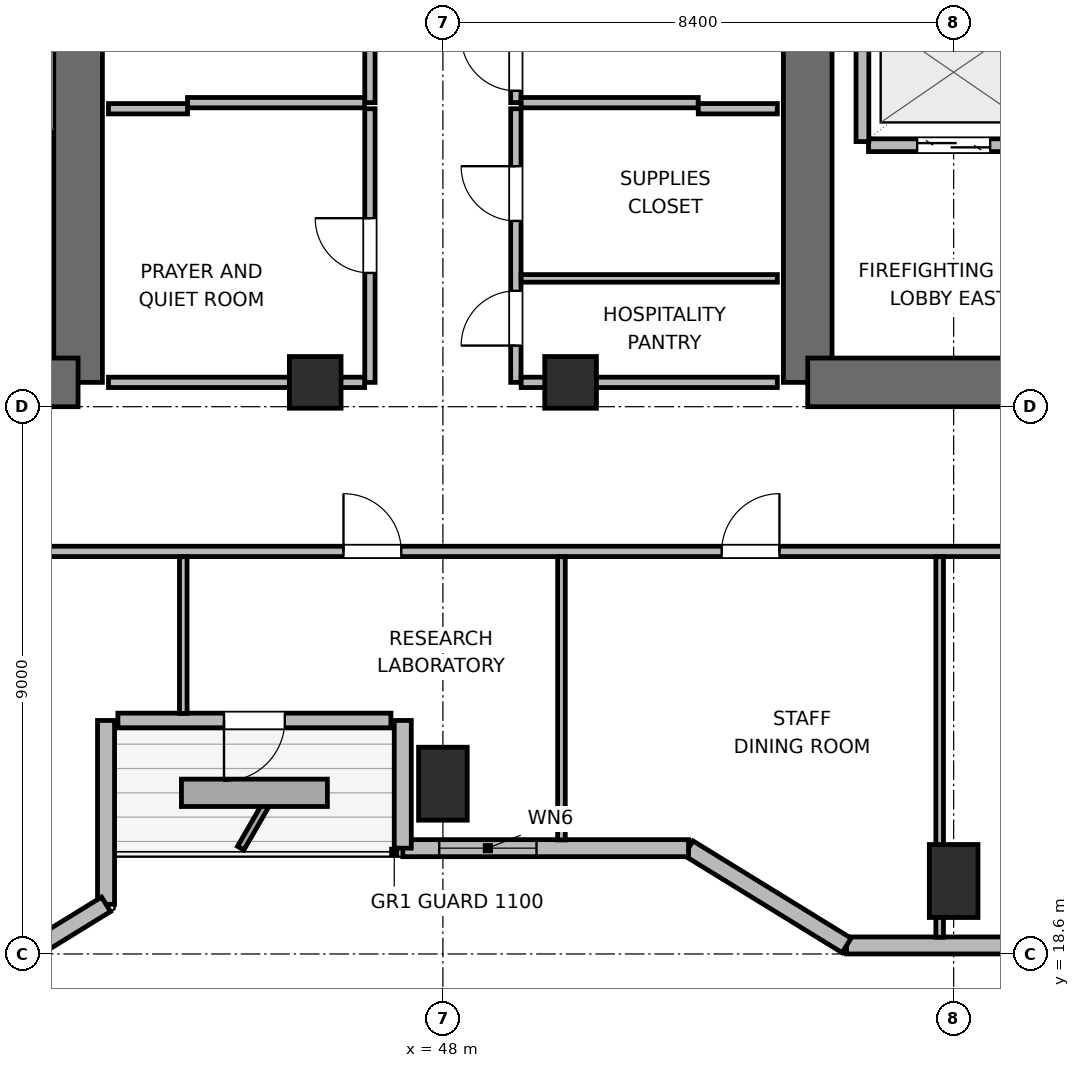
"""IFC4 building model, lengths in metres.
Left out: names, types, materials, properties, quantities, classifications, styles, units other than length and angle.
Written with IfcOpenShell. Run it as: python <this file> out.ifc"""

import sys

from ifc_helpers import new_model, si_unit, direction, frame, frame_2d, origin, origin_2d, place, context, subcontext, project, spatial, rectangle, extrude, element, fill, save


model = new_model("IFC4")
c1 = context("Model", 3, precision=1e-05, world=origin(), true_north=direction((0.0, 1.0)))
c2 = subcontext(c1, "Body", "Model", "MODEL_VIEW")
j1 = project(units=[si_unit("LENGTHUNIT", "METRE"), si_unit("PLANEANGLEUNIT", "RADIAN")], contexts=[c1])
p1 = place(None, origin())
s1 = spatial("IfcSite", under=j1, at=p1, CompositionType="ELEMENT")
p2 = place(p1, origin())
s2 = spatial("IfcBuilding", under=s1, at=p2, CompositionType="ELEMENT")
p3 = place(p2, frame((0.0, 0.0, 154.5)))
s3 = spatial("IfcBuildingStorey", under=s2, at=p3, CompositionType="ELEMENT", Elevation=154.5)
p4 = place(p3, frame((42.0, 28.0, 0.0), z_axis=(0.0, 0.0, 1.0), x_axis=(0.0, 1.0, 0.0)))
e1 = element("IfcWall", 1, at=p4, inside=s3, PredefinedType="SHEAR", context=c2, shape_type="SweptSolid", body=[
    extrude(rectangle(XDim=6.4, YDim=0.8, at=frame_2d((3.2, 0.0))), origin(), (0.0, 0.0, 1.0), 3.9),
])
p5 = place(p3, frame((32.8, 28.0, 0.0), z_axis=(0.0, 0.0, 1.0), x_axis=(1.0, 0.0, 0.0)))
e2 = element("IfcWall", 2, at=p5, inside=s3, PredefinedType="SHEAR", context=c2, shape_type="SweptSolid", body=[
    extrude(rectangle(XDim=9.2, YDim=0.8, at=frame_2d((4.6, 0.0))), origin(), (0.0, 0.0, 1.0), 3.9),
])
p6 = place(p5, frame((5.025, 0.0, 0.0)))
e3 = element("IfcOpeningElement", 3, at=p6, cuts=e2, PredefinedType="OPENING", context=c2, shape_type="SweptSolid", body=[
    extrude(rectangle(XDim=1.05, YDim=2.04, at=frame_2d((0.525, 1.02))), frame((0.0, 0.41, 0.0), z_axis=(0.0, -1.0, 0.0), x_axis=(1.0, 0.0, 0.0)), (0.0, 0.0, 1.0), 0.82),
])
p7 = place(p3, frame((54.0, 28.0, 0.0), z_axis=(0.0, 0.0, 1.0), x_axis=(0.0, 1.0, 0.0)))
e4 = element("IfcWall", 4, at=p7, inside=s3, PredefinedType="SHEAR", context=c2, shape_type="SweptSolid", body=[
    extrude(rectangle(XDim=7.8, YDim=0.8, at=frame_2d((3.9, 0.0))), origin(), (0.0, 0.0, 1.0), 3.9),
])
p8 = place(p3, frame((54.0, 28.0, 0.0), z_axis=(0.0, 0.0, 1.0), x_axis=(1.0, 0.0, 0.0)))
e5 = element("IfcWall", 5, at=p8, inside=s3, PredefinedType="SHEAR", context=c2, shape_type="SweptSolid", body=[
    extrude(rectangle(XDim=9.2, YDim=0.8, at=frame_2d((4.6, 0.0))), origin(), (0.0, 0.0, 1.0), 3.9),
])
p9 = place(p8, frame((3.975, 0.0, 0.0)))
e6 = element("IfcOpeningElement", 6, at=p9, cuts=e5, PredefinedType="OPENING", context=c2, shape_type="SweptSolid", body=[
    extrude(rectangle(XDim=1.05, YDim=2.04, at=frame_2d((0.525, 1.02))), frame((0.0, 0.41, 0.0), z_axis=(0.0, -1.0, 0.0), x_axis=(1.0, 0.0, 0.0)), (0.0, 0.0, 1.0), 0.82),
])
for number, where, z_axis, x_axis in (
    (7, (48.0, 21.4, 0.0), (0.0, 0.0, 1.0), (1.0, 0.0, 0.0)),
    (8, (56.4, 19.8, 0.0), (0.0, 0.0, 1.0), (1.0, 0.0, 0.0)),
):
    element("IfcColumn", number, at=place(p3, frame(where, z_axis=z_axis, x_axis=x_axis)), inside=s3, PredefinedType="COLUMN", context=c2, shape_type="SweptSolid", body=[
        extrude(rectangle(XDim=0.8, YDim=1.2, at=origin_2d()), origin(), (0.0, 0.0, 1.0), 3.9),
    ])
for number, where, z_axis, x_axis in (
    (9, (45.9, 28.0, 0.0), (0.0, 0.0, 1.0), (1.0, 0.0, 0.0)),
    (10, (50.1, 28.0, 0.0), (0.0, 0.0, 1.0), (1.0, 0.0, 0.0)),
):
    element("IfcColumn", number, at=place(p3, frame(where, z_axis=z_axis, x_axis=x_axis)), inside=s3, PredefinedType="COLUMN", context=c2, shape_type="SweptSolid", body=[
        extrude(rectangle(XDim=0.85, YDim=0.85, at=origin_2d()), origin(), (0.0, 0.0, 1.0), 3.9),
    ])
p10 = place(p3, frame((65.382, 18.74, 0.0), z_axis=(0.0, 0.0, 1.0), x_axis=(-1.0, 0.0, 0.0)))
e11 = element("IfcWall", 11, at=p10, inside=s3, PredefinedType="SOLIDWALL", context=c2, shape_type="SweptSolid", body=[
    extrude(rectangle(XDim=10.742, YDim=0.28, at=frame_2d((5.371, 0.0))), origin(), (0.0, 0.0, 1.0), 3.68),
])
p11 = place(p10, frame((3.951, 0.0, 0.85)))
e12 = element("IfcOpeningElement", 12, at=p11, cuts=e11, PredefinedType="OPENING", context=c2, shape_type="SweptSolid", body=[
    extrude(rectangle(XDim=1.5, YDim=1.1, at=frame_2d((0.75, 0.55))), frame((0.0, 0.15, 0.0), z_axis=(0.0, -1.0, 0.0), x_axis=(1.0, 0.0, 0.0)), (0.0, 0.0, 1.0), 0.3),
])
p12 = place(p3, frame((54.64, 18.74, 0.0), z_axis=(0.0, 0.0, 1.0), x_axis=(-0.851652825334, 0.524106349037, 0.0)))
e13 = element("IfcWall", 13, at=p12, inside=s3, PredefinedType="SOLIDWALL", context=c2, shape_type="SweptSolid", body=[
    extrude(rectangle(XDim=3.053, YDim=0.28, at=frame_2d((1.526, 0.0))), origin(), (0.0, 0.0, 1.0), 2.265),
])
p13 = place(p3, frame((52.04, 20.34, 0.0), z_axis=(0.0, 0.0, 1.0), x_axis=(-1.0, 0.0, 0.0)))
e14 = element("IfcWall", 14, at=p13, inside=s3, PredefinedType="SOLIDWALL", context=c2, shape_type="SweptSolid", body=[
    extrude(rectangle(XDim=4.699, YDim=0.28, at=frame_2d((2.35, 0.0))), origin(), (0.0, 0.0, 1.0), 2.265),
])
p14 = place(p13, frame((2.5, 0.0, 0.85)))
e15 = element("IfcOpeningElement", 15, at=p14, cuts=e14, PredefinedType="OPENING", context=c2, shape_type="SweptSolid", body=[
    extrude(rectangle(XDim=1.6, YDim=1.0, at=frame_2d((0.8, 0.5))), frame((0.0, 0.15, 0.0), z_axis=(0.0, -1.0, 0.0), x_axis=(1.0, 0.0, 0.0)), (0.0, 0.0, 1.0), 0.3),
])
p15 = place(p3, frame((47.34, 20.34, 0.0), z_axis=(0.0, 0.0, 1.0), x_axis=(0.0, 1.0, 0.0)))
e16 = element("IfcWall", 16, at=p15, inside=s3, PredefinedType="SOLIDWALL", context=c2, shape_type="SweptSolid", body=[
    extrude(rectangle(XDim=2.1, YDim=0.28, at=frame_2d((1.05, 0.0))), origin(), (0.0, 0.0, 1.0), 2.265),
])
p16 = place(p3, frame((47.145, 22.44, 0.0), z_axis=(0.0, 0.0, 1.0), x_axis=(-1.0, 0.0, 0.0)))
e17 = element("IfcWall", 17, at=p16, inside=s3, PredefinedType="SOLIDWALL", context=c2, shape_type="SweptSolid", body=[
    extrude(rectangle(XDim=4.49, YDim=0.24, at=frame_2d((2.245, 0.0))), origin(), (0.0, 0.0, 1.0), 3.68),
])
p17 = place(p16, frame((1.745, 0.0, 0.0)))
e18 = element("IfcOpeningElement", 18, at=p17, cuts=e17, PredefinedType="OPENING", context=c2, shape_type="SweptSolid", body=[
    extrude(rectangle(XDim=1.0, YDim=2.02, at=frame_2d((0.5, 1.01))), frame((0.0, 0.13, 0.0), z_axis=(0.0, -1.0, 0.0), x_axis=(1.0, 0.0, 0.0)), (0.0, 0.0, 1.0), 0.26),
])
p18 = place(p3, frame((42.46, 22.44, 0.0), z_axis=(0.0, 0.0, 1.0), x_axis=(0.0, -1.0, 0.0)))
e19 = element("IfcWall", 19, at=p18, inside=s3, PredefinedType="SOLIDWALL", context=c2, shape_type="SweptSolid", body=[
    extrude(rectangle(XDim=3.024, YDim=0.28, at=frame_2d((1.512, 0.0))), origin(), (0.0, 0.0, 1.0), 2.265),
])
p19 = place(p3, frame((42.46, 19.416, 0.0), z_axis=(0.0, 0.0, 1.0), x_axis=(-0.851801140441, -0.523865266212, 0.0)))
e20 = element("IfcWall", 20, at=p19, inside=s3, PredefinedType="SOLIDWALL", context=c2, shape_type="SweptSolid", body=[
    extrude(rectangle(XDim=1.291, YDim=0.28, at=frame_2d((0.646, 0.0))), origin(), (0.0, 0.0, 1.0), 3.68),
])
p20 = place(p3, frame((55.0, 31.9, 0.0), z_axis=(0.0, 0.0, 1.0), x_axis=(1.0, 0.0, 0.0)))
e21 = element("IfcWall", 21, at=p20, inside=s3, PredefinedType="PARTITIONING", context=c2, shape_type="SweptSolid", body=[
    extrude(rectangle(XDim=2.8, YDim=0.21, at=frame_2d((1.4, 0.0))), origin(), (0.0, 0.0, 1.0), 3.68),
])
p21 = place(p20, frame((0.8, 0.0, 0.0)))
e22 = element("IfcOpeningElement", 22, at=p21, cuts=e21, PredefinedType="OPENING", context=c2, shape_type="SweptSolid", body=[
    extrude(rectangle(XDim=1.2, YDim=2.04, at=frame_2d((0.6, 1.02))), frame((0.0, 0.115, 0.0), z_axis=(0.0, -1.0, 0.0), x_axis=(1.0, 0.0, 0.0)), (0.0, 0.0, 1.0), 0.23),
])
p22 = place(p3, frame((54.9, 31.96, 0.0), z_axis=(0.0, 0.0, 1.0), x_axis=(0.0, 1.0, 0.0)))
e23 = element("IfcWall", 23, at=p22, inside=s3, PredefinedType="PARTITIONING", context=c2, shape_type="SweptSolid", body=[
    extrude(rectangle(XDim=2.28, YDim=0.21, at=frame_2d((1.14, 0.0))), origin(), (0.0, 0.0, 1.0), 3.68),
])
p23 = place(p3, frame((46.8, 32.6, 0.0), z_axis=(0.0, 0.0, 1.0), x_axis=(0.0, 1.0, 0.0)))
e24 = element("IfcWall", 24, at=p23, inside=s3, PredefinedType="PARTITIONING", context=c2, shape_type="SweptSolid", body=[
    extrude(rectangle(XDim=3.8, YDim=0.17, at=frame_2d((1.9, 0.0))), origin(), (0.0, 0.0, 1.0), 3.68),
])
p24 = place(p23, frame((1.45, 0.0, 0.0)))
e25 = element("IfcOpeningElement", 25, at=p24, cuts=e24, PredefinedType="OPENING", context=c2, shape_type="SweptSolid", body=[
    extrude(rectangle(XDim=0.9, YDim=2.02, at=frame_2d((0.45, 1.01))), frame((0.0, 0.095, 0.0), z_axis=(0.0, -1.0, 0.0), x_axis=(1.0, 0.0, 0.0)), (0.0, 0.0, 1.0), 0.19),
])
p25 = place(p3, frame((43.8, 32.6, 0.0), z_axis=(0.0, 0.0, 1.0), x_axis=(1.0, 0.0, 0.0)))
e26 = element("IfcWall", 26, at=p25, inside=s3, PredefinedType="PARTITIONING", context=c2, shape_type="SweptSolid", body=[
    extrude(rectangle(XDim=2.913, YDim=0.17, at=frame_2d((1.457, 0.0))), origin(), (0.0, 0.0, 1.0), 3.68),
])
p26 = place(p3, frame((49.2, 32.6, 0.0), z_axis=(0.0, 0.0, 1.0), x_axis=(0.0, 1.0, 0.0)))
e27 = element("IfcWall", 27, at=p26, inside=s3, PredefinedType="PARTITIONING", context=c2, shape_type="SweptSolid", body=[
    extrude(rectangle(XDim=3.4, YDim=0.17, at=frame_2d((1.7, 0.0))), origin(), (0.0, 0.0, 1.0), 3.68),
])
p27 = place(p26, frame((0.196, 0.0, 0.0)))
e28 = element("IfcOpeningElement", 28, at=p27, cuts=e27, PredefinedType="OPENING", context=c2, shape_type="SweptSolid", body=[
    extrude(rectangle(XDim=0.9, YDim=2.02, at=frame_2d((0.45, 1.01))), frame((0.0, 0.095, 0.0), z_axis=(0.0, -1.0, 0.0), x_axis=(1.0, 0.0, 0.0)), (0.0, 0.0, 1.0), 0.19),
])
p28 = place(p26, frame((1.896, 0.0, 0.0)))
e29 = element("IfcOpeningElement", 29, at=p28, cuts=e27, PredefinedType="OPENING", context=c2, shape_type="SweptSolid", body=[
    extrude(rectangle(XDim=0.9, YDim=2.02, at=frame_2d((0.45, 1.01))), frame((0.0, 0.095, 0.0), z_axis=(0.0, -1.0, 0.0), x_axis=(1.0, 0.0, 0.0)), (0.0, 0.0, 1.0), 0.19),
])
p29 = place(p3, frame((49.287, 32.6, 0.0), z_axis=(0.0, 0.0, 1.0), x_axis=(1.0, 0.0, 0.0)))
e30 = element("IfcWall", 30, at=p29, inside=s3, PredefinedType="PARTITIONING", context=c2, shape_type="SweptSolid", body=[
    extrude(rectangle(XDim=2.913, YDim=0.17, at=frame_2d((1.457, 0.0))), origin(), (0.0, 0.0, 1.0), 3.68),
])
p30 = place(p3, frame((46.8, 28.0, 0.0), z_axis=(0.0, 0.0, 1.0), x_axis=(0.0, 1.0, 0.0)))
e31 = element("IfcWall", 31, at=p30, inside=s3, PredefinedType="PARTITIONING", context=c2, shape_type="SweptSolid", body=[
    extrude(rectangle(XDim=4.5, YDim=0.17, at=frame_2d((2.25, 0.0))), origin(), (0.0, 0.0, 1.0), 3.68),
])
p31 = place(p30, frame((1.8, 0.0, 0.0)))
e32 = element("IfcOpeningElement", 32, at=p31, cuts=e31, PredefinedType="OPENING", context=c2, shape_type="SweptSolid", body=[
    extrude(rectangle(XDim=0.9, YDim=2.02, at=frame_2d((0.45, 1.01))), frame((0.0, 0.095, 0.0), z_axis=(0.0, -1.0, 0.0), x_axis=(1.0, 0.0, 0.0)), (0.0, 0.0, 1.0), 0.19),
])
p32 = place(p3, frame((42.5, 28.0, 0.0), z_axis=(0.0, 0.0, 1.0), x_axis=(1.0, 0.0, 0.0)))
e33 = element("IfcWall", 33, at=p32, inside=s3, PredefinedType="PARTITIONING", context=c2, shape_type="SweptSolid", body=[
    extrude(rectangle(XDim=4.213, YDim=0.17, at=frame_2d((2.106, 0.0))), origin(), (0.0, 0.0, 1.0), 2.565),
])
p33 = place(p3, frame((42.5, 32.5, 0.0), z_axis=(0.0, 0.0, 1.0), x_axis=(1.0, 0.0, 0.0)))
e34 = element("IfcWall", 34, at=p33, inside=s3, PredefinedType="PARTITIONING", context=c2, shape_type="SweptSolid", body=[
    extrude(rectangle(XDim=1.3, YDim=0.17, at=frame_2d((0.65, 0.0))), origin(), (0.0, 0.0, 1.0), 3.68),
])
p34 = place(p3, frame((49.2, 28.0, 0.0), z_axis=(0.0, 0.0, 1.0), x_axis=(0.0, 1.0, 0.0)))
e35 = element("IfcWall", 35, at=p34, inside=s3, PredefinedType="PARTITIONING", context=c2, shape_type="SweptSolid", body=[
    extrude(rectangle(XDim=4.5, YDim=0.17, at=frame_2d((2.25, 0.0))), origin(), (0.0, 0.0, 1.0), 3.68),
])
p35 = place(p34, frame((0.605, 0.0, 0.0)))
e36 = element("IfcOpeningElement", 36, at=p35, cuts=e35, PredefinedType="OPENING", context=c2, shape_type="SweptSolid", body=[
    extrude(rectangle(XDim=0.9, YDim=2.02, at=frame_2d((0.45, 1.01))), frame((0.0, 0.095, 0.0), z_axis=(0.0, -1.0, 0.0), x_axis=(1.0, 0.0, 0.0)), (0.0, 0.0, 1.0), 0.19),
])
p36 = place(p34, frame((2.655, 0.0, 0.0)))
e37 = element("IfcOpeningElement", 37, at=p36, cuts=e35, PredefinedType="OPENING", context=c2, shape_type="SweptSolid", body=[
    extrude(rectangle(XDim=0.9, YDim=2.02, at=frame_2d((0.45, 1.01))), frame((0.0, 0.095, 0.0), z_axis=(0.0, -1.0, 0.0), x_axis=(1.0, 0.0, 0.0)), (0.0, 0.0, 1.0), 0.19),
])
p37 = place(p3, frame((49.287, 28.0, 0.0), z_axis=(0.0, 0.0, 1.0), x_axis=(1.0, 0.0, 0.0)))
e38 = element("IfcWall", 38, at=p37, inside=s3, PredefinedType="PARTITIONING", context=c2, shape_type="SweptSolid", body=[
    extrude(rectangle(XDim=4.213, YDim=0.17, at=frame_2d((2.106, 0.0))), origin(), (0.0, 0.0, 1.0), 2.565),
])
p38 = place(p3, frame((52.2, 32.5, 0.0), z_axis=(0.0, 0.0, 1.0), x_axis=(1.0, 0.0, 0.0)))
e39 = element("IfcWall", 39, at=p38, inside=s3, PredefinedType="PARTITIONING", context=c2, shape_type="SweptSolid", body=[
    extrude(rectangle(XDim=1.3, YDim=0.17, at=frame_2d((0.65, 0.0))), origin(), (0.0, 0.0, 1.0), 3.68),
])
p39 = place(p3, frame((49.287, 29.71, 0.0), z_axis=(0.0, 0.0, 1.0), x_axis=(1.0, 0.0, 0.0)))
e40 = element("IfcWall", 40, at=p39, inside=s3, PredefinedType="PARTITIONING", context=c2, shape_type="SweptSolid", body=[
    extrude(rectangle(XDim=4.213, YDim=0.125, at=frame_2d((2.106, 0.0))), origin(), (0.0, 0.0, 1.0), 3.68),
])
p40 = place(p3, frame((30.075, 25.22, 0.0), z_axis=(0.0, 0.0, 1.0), x_axis=(1.0, 0.0, 0.0)))
e41 = element("IfcWall", 41, at=p40, inside=s3, PredefinedType="PARTITIONING", context=c2, shape_type="SweptSolid", body=[
    extrude(rectangle(XDim=33.525, YDim=0.17, at=frame_2d((16.763, 0.0))), origin(), (0.0, 0.0, 1.0), 3.68),
])
p41 = place(p40, frame((3.238, 0.0, 0.0)))
e42 = element("IfcOpeningElement", 42, at=p41, cuts=e41, PredefinedType="OPENING", context=c2, shape_type="SweptSolid", body=[
    extrude(rectangle(XDim=0.95, YDim=2.04, at=frame_2d((0.475, 1.02))), frame((0.0, 0.095, 0.0), z_axis=(0.0, -1.0, 0.0), x_axis=(1.0, 0.0, 0.0)), (0.0, 0.0, 1.0), 0.19),
])
p42 = place(p40, frame((10.065, 0.0, 0.0)))
e43 = element("IfcOpeningElement", 43, at=p42, cuts=e41, PredefinedType="OPENING", context=c2, shape_type="SweptSolid", body=[
    extrude(rectangle(XDim=0.95, YDim=2.04, at=frame_2d((0.475, 1.02))), frame((0.0, 0.095, 0.0), z_axis=(0.0, -1.0, 0.0), x_axis=(1.0, 0.0, 0.0)), (0.0, 0.0, 1.0), 0.19),
])
p43 = place(p40, frame((16.29, 0.0, 0.0)))
e44 = element("IfcOpeningElement", 44, at=p43, cuts=e41, PredefinedType="OPENING", context=c2, shape_type="SweptSolid", body=[
    extrude(rectangle(XDim=0.95, YDim=2.04, at=frame_2d((0.475, 1.02))), frame((0.0, 0.095, 0.0), z_axis=(0.0, -1.0, 0.0), x_axis=(1.0, 0.0, 0.0)), (0.0, 0.0, 1.0), 0.19),
])
p44 = place(p40, frame((22.51, 0.0, 0.0)))
e45 = element("IfcOpeningElement", 45, at=p44, cuts=e41, PredefinedType="OPENING", context=c2, shape_type="SweptSolid", body=[
    extrude(rectangle(XDim=0.95, YDim=2.04, at=frame_2d((0.475, 1.02))), frame((0.0, 0.095, 0.0), z_axis=(0.0, -1.0, 0.0), x_axis=(1.0, 0.0, 0.0)), (0.0, 0.0, 1.0), 0.19),
])
p45 = place(p40, frame((29.335, 0.0, 0.0)))
e46 = element("IfcOpeningElement", 46, at=p45, cuts=e41, PredefinedType="OPENING", context=c2, shape_type="SweptSolid", body=[
    extrude(rectangle(XDim=0.95, YDim=2.04, at=frame_2d((0.475, 1.02))), frame((0.0, 0.095, 0.0), z_axis=(0.0, -1.0, 0.0), x_axis=(1.0, 0.0, 0.0)), (0.0, 0.0, 1.0), 0.19),
])
p46 = place(p3, frame((43.73, 22.555, 0.0), z_axis=(0.0, 0.0, 1.0), x_axis=(0.0, 1.0, 0.0)))
e47 = element("IfcWall", 47, at=p46, inside=s3, PredefinedType="PARTITIONING", context=c2, shape_type="SweptSolid", body=[
    extrude(rectangle(XDim=2.578, YDim=0.125, at=frame_2d((1.289, 0.0))), origin(), (0.0, 0.0, 1.0), 3.043),
])
p47 = place(p3, frame((49.95, 20.475, 0.0), z_axis=(0.0, 0.0, 1.0), x_axis=(0.0, 1.0, 0.0)))
e48 = element("IfcWall", 48, at=p47, inside=s3, PredefinedType="PARTITIONING", context=c2, shape_type="SweptSolid", body=[
    extrude(rectangle(XDim=4.658, YDim=0.125, at=frame_2d((2.329, 0.0))), origin(), (0.0, 0.0, 1.0), 3.68),
])
p48 = place(p3, frame((56.17, 18.875, 0.0), z_axis=(0.0, 0.0, 1.0), x_axis=(0.0, 1.0, 0.0)))
e49 = element("IfcWall", 49, at=p48, inside=s3, PredefinedType="PARTITIONING", context=c2, shape_type="SweptSolid", body=[
    extrude(rectangle(XDim=6.258, YDim=0.125, at=frame_2d((3.129, 0.0))), origin(), (0.0, 0.0, 1.0), 3.043),
])
p49 = place(p14, origin())
e50 = element("IfcWindow", 50, at=p49, inside=s3, PartitioningType="SINGLE_PANEL", PredefinedType="WINDOW", context=c2, shape_type="SweptSolid", body=[
    extrude(rectangle(XDim=1.6, YDim=1.0, at=frame_2d((0.8, 0.5))), frame((0.0, 0.03, 0.0), z_axis=(0.0, -1.0, 0.0), x_axis=(1.0, 0.0, 0.0)), (0.0, 0.0, 1.0), 0.06),
])
fill(e15, e50)
p50 = place(p17, origin())
e51 = element("IfcDoor", 51, at=p50, inside=s3, OperationType="SINGLE_SWING_RIGHT", PredefinedType="DOOR", context=c2, shape_type="SweptSolid", body=[
    extrude(rectangle(XDim=1.0, YDim=2.02, at=frame_2d((0.5, 1.01))), frame((0.0, 0.025, 0.0), z_axis=(0.0, -1.0, 0.0), x_axis=(1.0, 0.0, 0.0)), (0.0, 0.0, 1.0), 0.05),
])
fill(e18, e51)
p51 = place(p21, origin())
e52 = element("IfcDoor", 52, at=p51, inside=s3, OperationType="DOUBLE_DOOR_SLIDING", PredefinedType="DOOR", context=c2, shape_type="SweptSolid", body=[
    extrude(rectangle(XDim=1.2, YDim=2.04, at=frame_2d((0.6, 1.02))), frame((0.0, 0.025, 0.0), z_axis=(0.0, -1.0, 0.0), x_axis=(1.0, 0.0, 0.0)), (0.0, 0.0, 1.0), 0.05),
])
fill(e22, e52)
p52 = place(p27, origin())
e53 = element("IfcDoor", 53, at=p52, inside=s3, OperationType="SINGLE_SWING_RIGHT", PredefinedType="DOOR", context=c2, shape_type="SweptSolid", body=[
    extrude(rectangle(XDim=0.9, YDim=2.02, at=frame_2d((0.45, 1.01))), frame((0.0, 0.025, 0.0), z_axis=(0.0, -1.0, 0.0), x_axis=(1.0, 0.0, 0.0)), (0.0, 0.0, 1.0), 0.05),
])
fill(e28, e53)
p53 = place(p31, origin())
e54 = element("IfcDoor", 54, at=p53, inside=s3, OperationType="SINGLE_SWING_RIGHT", PredefinedType="DOOR", context=c2, shape_type="SweptSolid", body=[
    extrude(rectangle(XDim=0.9, YDim=2.02, at=frame_2d((0.45, 1.01))), frame((0.0, 0.025, 0.0), z_axis=(0.0, -1.0, 0.0), x_axis=(1.0, 0.0, 0.0)), (0.0, 0.0, 1.0), 0.05),
])
fill(e32, e54)
p54 = place(p35, origin())
e55 = element("IfcDoor", 55, at=p54, inside=s3, OperationType="SINGLE_SWING_LEFT", PredefinedType="DOOR", context=c2, shape_type="SweptSolid", body=[
    extrude(rectangle(XDim=0.9, YDim=2.02, at=frame_2d((0.45, 1.01))), frame((0.0, 0.025, 0.0), z_axis=(0.0, -1.0, 0.0), x_axis=(1.0, 0.0, 0.0)), (0.0, 0.0, 1.0), 0.05),
])
fill(e36, e55)
p55 = place(p36, origin())
e56 = element("IfcDoor", 56, at=p55, inside=s3, OperationType="SINGLE_SWING_RIGHT", PredefinedType="DOOR", context=c2, shape_type="SweptSolid", body=[
    extrude(rectangle(XDim=0.9, YDim=2.02, at=frame_2d((0.45, 1.01))), frame((0.0, 0.025, 0.0), z_axis=(0.0, -1.0, 0.0), x_axis=(1.0, 0.0, 0.0)), (0.0, 0.0, 1.0), 0.05),
])
fill(e37, e56)
p56 = place(p43, origin())
e57 = element("IfcDoor", 57, at=p56, inside=s3, OperationType="SINGLE_SWING_LEFT", PredefinedType="DOOR", context=c2, shape_type="SweptSolid", body=[
    extrude(rectangle(XDim=0.95, YDim=2.04, at=frame_2d((0.475, 1.02))), frame((0.0, 0.025, 0.0), z_axis=(0.0, -1.0, 0.0), x_axis=(1.0, 0.0, 0.0)), (0.0, 0.0, 1.0), 0.05),
])
fill(e44, e57)
p57 = place(p44, origin())
e58 = element("IfcDoor", 58, at=p57, inside=s3, OperationType="SINGLE_SWING_RIGHT", PredefinedType="DOOR", context=c2, shape_type="SweptSolid", body=[
    extrude(rectangle(XDim=0.95, YDim=2.04, at=frame_2d((0.475, 1.02))), frame((0.0, 0.025, 0.0), z_axis=(0.0, -1.0, 0.0), x_axis=(1.0, 0.0, 0.0)), (0.0, 0.0, 1.0), 0.05),
])
fill(e45, e58)
save(model, sys.argv[1])
